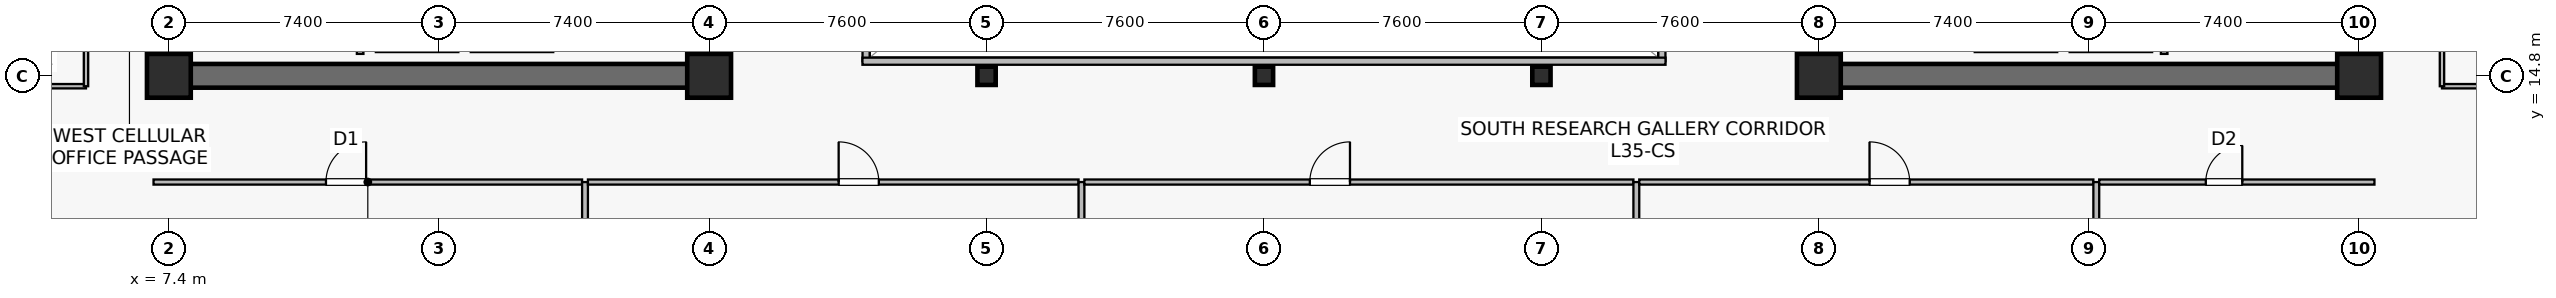
"""IFC4 building model, lengths in metres.
Left out: names, types, materials, properties, quantities, classifications, styles, units other than length and angle.
Written with IfcOpenShell. Run it as: python <this file> out.ifc"""

import sys

from ifc_helpers import new_model, si_unit, direction, frame, frame_2d, origin, origin_2d, place, context, subcontext, project, spatial, rectangle, hollow_rectangle, extrude, source, transform, mapped, element, fill, save


model = new_model("IFC4")
c1 = context("Model", 3, precision=1e-05, world=origin(), true_north=direction((0.0, 1.0)))
c2 = subcontext(c1, "Body", "Model", "MODEL_VIEW")
j1 = project(units=[si_unit("LENGTHUNIT", "METRE"), si_unit("PLANEANGLEUNIT", "RADIAN")], contexts=[c1])
p1 = place(None, origin())
s1 = spatial("IfcSite", under=j1, at=p1, CompositionType="ELEMENT")
p2 = place(p1, origin())
s2 = spatial("IfcBuilding", under=s1, at=p2, CompositionType="ELEMENT")
p3 = place(p2, frame((0.0, 0.0, 146.1)))
s3 = spatial("IfcBuildingStorey", under=s2, at=p3, CompositionType="ELEMENT", Elevation=146.1)
p4 = place(p3, frame((7.075, 14.8, 0.0), z_axis=(0.0, 0.0, 1.0), x_axis=(1.0, 0.0, 0.0)))
e1 = element("IfcWall", 1, at=p4, inside=s3, PredefinedType="SHEAR", context=c2, shape_type="SweptSolid", body=[
    extrude(rectangle(XDim=15.45, YDim=0.65, at=frame_2d((7.725, 0.0))), origin(), (0.0, 0.0, 1.0), 3.79),
])
p5 = place(p3, frame((7.4, 15.125, 0.0), z_axis=(0.0, 0.0, 1.0), x_axis=(0.0, 1.0, 0.0)))
e2 = element("IfcWall", 2, at=p5, inside=s3, PredefinedType="SHEAR", context=c2, shape_type="SweptSolid", body=[
    extrude(rectangle(XDim=18.35, YDim=0.65, at=frame_2d((9.175, 0.0))), origin(), (0.0, 0.0, 1.0), 3.79),
])
p6 = place(p3, frame((22.2, 15.125, 0.0), z_axis=(0.0, 0.0, 1.0), x_axis=(0.0, 1.0, 0.0)))
e3 = element("IfcWall", 3, at=p6, inside=s3, PredefinedType="SHEAR", context=c2, shape_type="SweptSolid", body=[
    extrude(rectangle(XDim=18.35, YDim=0.65, at=frame_2d((9.175, 0.0))), origin(), (0.0, 0.0, 1.0), 3.79),
])
p7 = place(p6, frame((3.425, 0.0, 0.0)))
e4 = element("IfcOpeningElement", 4, at=p7, cuts=e3, PredefinedType="OPENING", context=c2, shape_type="SweptSolid", body=[
    extrude(rectangle(XDim=1.42, YDim=2.2, at=frame_2d((0.71, 1.1))), frame((0.0, 0.335, 0.0), z_axis=(0.0, -1.0, 0.0), x_axis=(1.0, 0.0, 0.0)), (0.0, 0.0, 1.0), 0.67),
])
p8 = place(p3, frame((52.275, 14.8, 0.0), z_axis=(0.0, 0.0, 1.0), x_axis=(1.0, 0.0, 0.0)))
e5 = element("IfcWall", 5, at=p8, inside=s3, PredefinedType="SHEAR", context=c2, shape_type="SweptSolid", body=[
    extrude(rectangle(XDim=15.45, YDim=0.65, at=frame_2d((7.725, 0.0))), origin(), (0.0, 0.0, 1.0), 3.79),
])
p9 = place(p3, frame((52.6, 15.125, 0.0), z_axis=(0.0, 0.0, 1.0), x_axis=(0.0, 1.0, 0.0)))
e6 = element("IfcWall", 6, at=p9, inside=s3, PredefinedType="SHEAR", context=c2, shape_type="SweptSolid", body=[
    extrude(rectangle(XDim=18.35, YDim=0.65, at=frame_2d((9.175, 0.0))), origin(), (0.0, 0.0, 1.0), 3.79),
])
p10 = place(p9, frame((3.425, 0.0, 0.0)))
e7 = element("IfcOpeningElement", 7, at=p10, cuts=e6, PredefinedType="OPENING", context=c2, shape_type="SweptSolid", body=[
    extrude(rectangle(XDim=1.42, YDim=2.2, at=frame_2d((0.71, 1.1))), frame((0.0, 0.335, 0.0), z_axis=(0.0, -1.0, 0.0), x_axis=(1.0, 0.0, 0.0)), (0.0, 0.0, 1.0), 0.67),
])
p11 = place(p3, frame((67.4, 15.125, 0.0), z_axis=(0.0, 0.0, 1.0), x_axis=(0.0, 1.0, 0.0)))
e8 = element("IfcWall", 8, at=p11, inside=s3, PredefinedType="SHEAR", context=c2, shape_type="SweptSolid", body=[
    extrude(rectangle(XDim=18.35, YDim=0.65, at=frame_2d((9.175, 0.0))), origin(), (0.0, 0.0, 1.0), 3.79),
])
m1 = source(origin(), c2, "Body", "SweptSolid", [
    extrude(rectangle(XDim=1.2, YDim=1.2, at=origin_2d()), origin(), (0.0, 0.0, 1.0), 4.1),
])
for number, where, z_axis, x_axis in (
    (9, (7.4, 14.8, 0.0), (0.0, 0.0, 1.0), (1.0, 0.0, 0.0)),
    (10, (22.2, 14.8, 0.0), (0.0, 0.0, 1.0), (1.0, 0.0, 0.0)),
    (11, (52.6, 14.8, 0.0), (0.0, 0.0, 1.0), (1.0, 0.0, 0.0)),
    (12, (67.4, 14.8, 0.0), (0.0, 0.0, 1.0), (1.0, 0.0, 0.0)),
):
    element("IfcColumn", number, at=place(p3, frame(where, z_axis=z_axis, x_axis=x_axis)), inside=s3, PredefinedType="COLUMN", context=c2, shape_type="MappedRepresentation", body=[
        mapped(m1, transform((0.0, 0.0, 0.0), scale=1.0)),
    ])
m2 = source(origin(), c2, "Body", "SweptSolid", [
    extrude(hollow_rectangle(XDim=0.5, YDim=0.5, WallThickness=0.022, at=origin_2d()), origin(), (0.0, 0.0, 1.0), 4.1),
])
for number, where, z_axis, x_axis in (
    (13, (29.8, 14.8, 0.0), (0.0, 0.0, 1.0), (1.0, 0.0, 0.0)),
    (14, (37.4, 14.8, 0.0), (0.0, 0.0, 1.0), (1.0, 0.0, 0.0)),
    (15, (45.0, 14.8, 0.0), (0.0, 0.0, 1.0), (1.0, 0.0, 0.0)),
):
    element("IfcColumn", number, at=place(p3, frame(where, z_axis=z_axis, x_axis=x_axis)), inside=s3, PredefinedType="COLUMN", context=c2, shape_type="MappedRepresentation", body=[
        mapped(m2, transform((0.0, 0.0, 0.0), scale=1.0)),
    ])
p12 = place(p3, frame((13.07, 15.55, 0.0), z_axis=(0.0, 0.0, 1.0), x_axis=(1.0, 0.0, 0.0)))
e16 = element("IfcWall", 16, at=p12, inside=s3, PredefinedType="SOLIDWALL", context=c2, shape_type="SweptSolid", body=[
    extrude(rectangle(XDim=2.26, YDim=0.2, at=frame_2d((1.13, 0.0))), origin(), (0.0, 0.0, 1.0), 3.125),
])
p13 = place(p3, frame((15.67, 15.55, 0.0), z_axis=(0.0, 0.0, 1.0), x_axis=(1.0, 0.0, 0.0)))
e17 = element("IfcWall", 17, at=p13, inside=s3, PredefinedType="SOLIDWALL", context=c2, shape_type="SweptSolid", body=[
    extrude(rectangle(XDim=2.26, YDim=0.2, at=frame_2d((1.13, 0.0))), origin(), (0.0, 0.0, 1.0), 3.79),
])
p14 = place(p3, frame((12.64, 15.4, 0.0), z_axis=(0.0, 0.0, 1.0), x_axis=(0.0, 1.0, 0.0)))
e18 = element("IfcWall", 18, at=p14, inside=s3, PredefinedType="SOLIDWALL", context=c2, shape_type="SweptSolid", body=[
    extrude(rectangle(XDim=2.4, YDim=0.18, at=frame_2d((1.2, 0.0))), origin(), (0.0, 0.0, 1.0), 3.79),
])
p15 = place(p3, frame((59.47, 15.55, 0.0), z_axis=(0.0, 0.0, 1.0), x_axis=(1.0, 0.0, 0.0)))
e19 = element("IfcWall", 19, at=p15, inside=s3, PredefinedType="SOLIDWALL", context=c2, shape_type="SweptSolid", body=[
    extrude(rectangle(XDim=2.26, YDim=0.2, at=frame_2d((1.13, 0.0))), origin(), (0.0, 0.0, 1.0), 3.125),
])
p16 = place(p3, frame((56.87, 15.55, 0.0), z_axis=(0.0, 0.0, 1.0), x_axis=(1.0, 0.0, 0.0)))
e20 = element("IfcWall", 20, at=p16, inside=s3, PredefinedType="SOLIDWALL", context=c2, shape_type="SweptSolid", body=[
    extrude(rectangle(XDim=2.26, YDim=0.2, at=frame_2d((1.13, 0.0))), origin(), (0.0, 0.0, 1.0), 3.79),
])
p17 = place(p3, frame((62.06, 15.4, 0.0), z_axis=(0.0, 0.0, 1.0), x_axis=(0.0, 1.0, 0.0)))
e21 = element("IfcWall", 21, at=p17, inside=s3, PredefinedType="SOLIDWALL", context=c2, shape_type="SweptSolid", body=[
    extrude(rectangle(XDim=2.4, YDim=0.18, at=frame_2d((1.2, 0.0))), origin(), (0.0, 0.0, 1.0), 3.79),
])
p18 = place(p3, frame((26.5, 15.2, 0.0), z_axis=(0.0, 0.0, 1.0), x_axis=(0.0, 1.0, 0.0)))
e22 = element("IfcWall", 22, at=p18, inside=s3, PredefinedType="SOLIDWALL", context=c2, shape_type="SweptSolid", body=[
    extrude(rectangle(XDim=18.2, YDim=0.195, at=frame_2d((9.1, 0.0))), origin(), (0.0, 0.0, 1.0), 3.79),
])
p19 = place(p18, frame((1.8, 0.0, 0.9)))
e23 = element("IfcOpeningElement", 23, at=p19, cuts=e22, PredefinedType="OPENING", context=c2, shape_type="SweptSolid", body=[
    extrude(rectangle(XDim=1.2, YDim=1.35, at=frame_2d((0.6, 0.675))), frame((0.0, 0.107, 0.0), z_axis=(0.0, -1.0, 0.0), x_axis=(1.0, 0.0, 0.0)), (0.0, 0.0, 1.0), 0.215),
])
p20 = place(p18, frame((13.2, 0.0, 0.9)))
e24 = element("IfcOpeningElement", 24, at=p20, cuts=e22, PredefinedType="OPENING", context=c2, shape_type="SweptSolid", body=[
    extrude(rectangle(XDim=1.2, YDim=1.35, at=frame_2d((0.6, 0.675))), frame((0.0, 0.107, 0.0), z_axis=(0.0, -1.0, 0.0), x_axis=(1.0, 0.0, 0.0)), (0.0, 0.0, 1.0), 0.215),
])
p21 = place(p3, frame((48.3, 15.2, 0.0), z_axis=(0.0, 0.0, 1.0), x_axis=(0.0, 1.0, 0.0)))
e25 = element("IfcWall", 25, at=p21, inside=s3, PredefinedType="SOLIDWALL", context=c2, shape_type="SweptSolid", body=[
    extrude(rectangle(XDim=18.2, YDim=0.195, at=frame_2d((9.1, 0.0))), origin(), (0.0, 0.0, 1.0), 3.79),
])
p22 = place(p21, frame((1.8, 0.0, 0.9)))
e26 = element("IfcOpeningElement", 26, at=p22, cuts=e25, PredefinedType="OPENING", context=c2, shape_type="SweptSolid", body=[
    extrude(rectangle(XDim=1.2, YDim=1.35, at=frame_2d((0.6, 0.675))), frame((0.0, 0.107, 0.0), z_axis=(0.0, -1.0, 0.0), x_axis=(1.0, 0.0, 0.0)), (0.0, 0.0, 1.0), 0.215),
])
p23 = place(p21, frame((13.2, 0.0, 0.9)))
e27 = element("IfcOpeningElement", 27, at=p23, cuts=e25, PredefinedType="OPENING", context=c2, shape_type="SweptSolid", body=[
    extrude(rectangle(XDim=1.2, YDim=1.35, at=frame_2d((0.6, 0.675))), frame((0.0, 0.107, 0.0), z_axis=(0.0, -1.0, 0.0), x_axis=(1.0, 0.0, 0.0)), (0.0, 0.0, 1.0), 0.215),
])
p24 = place(p3, frame((26.4, 15.2, 0.0), z_axis=(0.0, 0.0, 1.0), x_axis=(1.0, 0.0, 0.0)))
e28 = element("IfcWall", 28, at=p24, inside=s3, PredefinedType="SOLIDWALL", context=c2, shape_type="SweptSolid", body=[
    extrude(rectangle(XDim=22.0, YDim=0.195, at=frame_2d((11.0, 0.0))), origin(), (0.0, 0.0, 1.0), 3.79),
])
p25 = place(p3, frame((6.98, 11.89, 0.0), z_axis=(0.0, 0.0, 1.0), x_axis=(1.0, 0.0, 0.0)))
e29 = element("IfcWall", 29, at=p25, inside=s3, PredefinedType="PARTITIONING", context=c2, shape_type="SweptSolid", body=[
    extrude(rectangle(XDim=11.74, YDim=0.14, at=frame_2d((5.87, 0.0))), origin(), (0.0, 0.0, 1.0), 3.125),
])
p26 = place(p25, frame((4.724, 0.0, 0.0)))
e30 = element("IfcOpeningElement", 30, at=p26, cuts=e29, PredefinedType="OPENING", context=c2, shape_type="SweptSolid", body=[
    extrude(rectangle(XDim=1.1, YDim=2.18, at=frame_2d((0.55, 1.09))), frame((0.0, 0.08, 0.0), z_axis=(0.0, -1.0, 0.0), x_axis=(1.0, 0.0, 0.0)), (0.0, 0.0, 1.0), 0.16),
])
p27 = place(p3, frame((18.8, 1.41, 0.0), z_axis=(0.0, 0.0, 1.0), x_axis=(0.0, 1.0, 0.0)))
e31 = element("IfcWall", 31, at=p27, inside=s3, PredefinedType="PARTITIONING", context=c2, shape_type="SweptSolid", body=[
    extrude(rectangle(XDim=10.48, YDim=0.16, at=frame_2d((5.24, 0.0))), origin(), (0.0, 0.0, 1.0), 3.075),
])
p28 = place(p3, frame((18.88, 11.89, 0.0), z_axis=(0.0, 0.0, 1.0), x_axis=(1.0, 0.0, 0.0)))
e32 = element("IfcWall", 32, at=p28, inside=s3, PredefinedType="PARTITIONING", context=c2, shape_type="SweptSolid", body=[
    extrude(rectangle(XDim=13.44, YDim=0.14, at=frame_2d((6.72, 0.0))), origin(), (0.0, 0.0, 1.0), 3.125),
])
p29 = place(p28, frame((6.868, 0.0, 0.0)))
e33 = element("IfcOpeningElement", 33, at=p29, cuts=e32, PredefinedType="OPENING", context=c2, shape_type="SweptSolid", body=[
    extrude(rectangle(XDim=1.1, YDim=2.18, at=frame_2d((0.55, 1.09))), frame((0.0, 0.08, 0.0), z_axis=(0.0, -1.0, 0.0), x_axis=(1.0, 0.0, 0.0)), (0.0, 0.0, 1.0), 0.16),
])
p30 = place(p3, frame((32.4, 2.61, 0.0), z_axis=(0.0, 0.0, 1.0), x_axis=(0.0, 1.0, 0.0)))
e34 = element("IfcWall", 34, at=p30, inside=s3, PredefinedType="PARTITIONING", context=c2, shape_type="SweptSolid", body=[
    extrude(rectangle(XDim=9.28, YDim=0.16, at=frame_2d((4.64, 0.0))), origin(), (0.0, 0.0, 1.0), 3.075),
])
p31 = place(p3, frame((32.48, 11.89, 0.0), z_axis=(0.0, 0.0, 1.0), x_axis=(1.0, 0.0, 0.0)))
e35 = element("IfcWall", 35, at=p31, inside=s3, PredefinedType="PARTITIONING", context=c2, shape_type="SweptSolid", body=[
    extrude(rectangle(XDim=15.04, YDim=0.14, at=frame_2d((7.52, 0.0))), origin(), (0.0, 0.0, 1.0), 3.125),
])
p32 = place(p31, frame((6.176, 0.0, 0.0)))
e36 = element("IfcOpeningElement", 36, at=p32, cuts=e35, PredefinedType="OPENING", context=c2, shape_type="SweptSolid", body=[
    extrude(rectangle(XDim=1.1, YDim=2.18, at=frame_2d((0.55, 1.09))), frame((0.0, 0.08, 0.0), z_axis=(0.0, -1.0, 0.0), x_axis=(1.0, 0.0, 0.0)), (0.0, 0.0, 1.0), 0.16),
])
p33 = place(p3, frame((47.6, 2.61, 0.0), z_axis=(0.0, 0.0, 1.0), x_axis=(0.0, 1.0, 0.0)))
e37 = element("IfcWall", 37, at=p33, inside=s3, PredefinedType="PARTITIONING", context=c2, shape_type="SweptSolid", body=[
    extrude(rectangle(XDim=9.28, YDim=0.16, at=frame_2d((4.64, 0.0))), origin(), (0.0, 0.0, 1.0), 3.075),
])
p34 = place(p3, frame((47.68, 11.89, 0.0), z_axis=(0.0, 0.0, 1.0), x_axis=(1.0, 0.0, 0.0)))
e38 = element("IfcWall", 38, at=p34, inside=s3, PredefinedType="PARTITIONING", context=c2, shape_type="SweptSolid", body=[
    extrude(rectangle(XDim=12.44, YDim=0.14, at=frame_2d((6.22, 0.0))), origin(), (0.0, 0.0, 1.0), 3.125),
])
p35 = place(p34, frame((6.308, 0.0, 0.0)))
e39 = element("IfcOpeningElement", 39, at=p35, cuts=e38, PredefinedType="OPENING", context=c2, shape_type="SweptSolid", body=[
    extrude(rectangle(XDim=1.1, YDim=2.18, at=frame_2d((0.55, 1.09))), frame((0.0, 0.08, 0.0), z_axis=(0.0, -1.0, 0.0), x_axis=(1.0, 0.0, 0.0)), (0.0, 0.0, 1.0), 0.16),
])
p36 = place(p3, frame((60.2, 1.41, 0.0), z_axis=(0.0, 0.0, 1.0), x_axis=(0.0, 1.0, 0.0)))
e40 = element("IfcWall", 40, at=p36, inside=s3, PredefinedType="PARTITIONING", context=c2, shape_type="SweptSolid", body=[
    extrude(rectangle(XDim=10.48, YDim=0.16, at=frame_2d((5.24, 0.0))), origin(), (0.0, 0.0, 1.0), 3.075),
])
p37 = place(p3, frame((60.28, 11.89, 0.0), z_axis=(0.0, 0.0, 1.0), x_axis=(1.0, 0.0, 0.0)))
e41 = element("IfcWall", 41, at=p37, inside=s3, PredefinedType="PARTITIONING", context=c2, shape_type="SweptSolid", body=[
    extrude(rectangle(XDim=7.54, YDim=0.14, at=frame_2d((3.77, 0.0))), origin(), (0.0, 0.0, 1.0), 3.275),
])
p38 = place(p37, frame((2.92, 0.0, 0.0)))
e42 = element("IfcOpeningElement", 42, at=p38, cuts=e41, PredefinedType="OPENING", context=c2, shape_type="SweptSolid", body=[
    extrude(rectangle(XDim=1.0, YDim=2.15, at=frame_2d((0.5, 1.075))), frame((0.0, 0.08, 0.0), z_axis=(0.0, -1.0, 0.0), x_axis=(1.0, 0.0, 0.0)), (0.0, 0.0, 1.0), 0.16),
])
p39 = place(p3, frame((2.11, 14.515, 0.0), z_axis=(0.0, 0.0, 1.0), x_axis=(1.0, 0.0, 0.0)))
e43 = element("IfcWall", 43, at=p39, inside=s3, PredefinedType="PARTITIONING", context=c2, shape_type="SweptSolid", body=[
    extrude(rectangle(XDim=3.02, YDim=0.12, at=frame_2d((1.51, 0.0))), origin(), (0.0, 0.0, 1.0), 3.79),
])
p40 = place(p3, frame((5.13, 14.515, 0.0), z_axis=(0.0, 0.0, 1.0), x_axis=(0.0, 1.0, 0.0)))
e44 = element("IfcWall", 44, at=p40, inside=s3, PredefinedType="PARTITIONING", context=c2, shape_type="SweptSolid", body=[
    extrude(rectangle(XDim=10.025, YDim=0.12, at=frame_2d((5.013, 0.0))), origin(), (0.0, 0.0, 1.0), 3.79),
])
p41 = place(p40, frame((4.562, 0.0, 0.0)))
e45 = element("IfcOpeningElement", 45, at=p41, cuts=e44, PredefinedType="OPENING", context=c2, shape_type="SweptSolid", body=[
    extrude(rectangle(XDim=0.9, YDim=2.1, at=frame_2d((0.45, 1.05))), frame((0.0, 0.07, 0.0), z_axis=(0.0, -1.0, 0.0), x_axis=(1.0, 0.0, 0.0)), (0.0, 0.0, 1.0), 0.14),
])
p42 = place(p3, frame((69.67, 14.515, 0.0), z_axis=(0.0, 0.0, 1.0), x_axis=(1.0, 0.0, 0.0)))
e46 = element("IfcWall", 46, at=p42, inside=s3, PredefinedType="PARTITIONING", context=c2, shape_type="SweptSolid", body=[
    extrude(rectangle(XDim=3.02, YDim=0.12, at=frame_2d((1.51, 0.0))), origin(), (0.0, 0.0, 1.0), 3.79),
])
p43 = place(p3, frame((69.67, 14.515, 0.0), z_axis=(0.0, 0.0, 1.0), x_axis=(0.0, 1.0, 0.0)))
e47 = element("IfcWall", 47, at=p43, inside=s3, PredefinedType="PARTITIONING", context=c2, shape_type="SweptSolid", body=[
    extrude(rectangle(XDim=5.225, YDim=0.12, at=frame_2d((2.613, 0.0))), origin(), (0.0, 0.0, 1.0), 3.79),
])
p44 = place(p43, frame((2.163, 0.0, 0.0)))
e48 = element("IfcOpeningElement", 48, at=p44, cuts=e47, PredefinedType="OPENING", context=c2, shape_type="SweptSolid", body=[
    extrude(rectangle(XDim=0.9, YDim=2.1, at=frame_2d((0.45, 1.05))), frame((0.0, 0.07, 0.0), z_axis=(0.0, -1.0, 0.0), x_axis=(1.0, 0.0, 0.0)), (0.0, 0.0, 1.0), 0.14),
])
m3 = source(origin(), c2, "Body", "SweptSolid", [
    extrude(rectangle(XDim=1.1, YDim=2.18, at=frame_2d((0.55, 1.09))), frame((0.0, 0.025, 0.0), z_axis=(0.0, -1.0, 0.0), x_axis=(1.0, 0.0, 0.0)), (0.0, 0.0, 1.0), 0.05),
])
p45 = place(p26, origin())
e49 = element("IfcDoor", 49, at=p45, inside=s3, OperationType="SINGLE_SWING_RIGHT", PredefinedType="DOOR", context=c2, shape_type="MappedRepresentation", body=[
    mapped(m3, transform((0.0, 0.0, 0.0), scale=1.0)),
])
fill(e30, e49)
p46 = place(p29, origin())
e50 = element("IfcDoor", 50, at=p46, inside=s3, OperationType="SINGLE_SWING_LEFT", PredefinedType="DOOR", context=c2, shape_type="MappedRepresentation", body=[
    mapped(m3, transform((0.0, 0.0, 0.0), scale=1.0)),
])
fill(e33, e50)
p47 = place(p32, origin())
e51 = element("IfcDoor", 51, at=p47, inside=s3, OperationType="SINGLE_SWING_RIGHT", PredefinedType="DOOR", context=c2, shape_type="MappedRepresentation", body=[
    mapped(m3, transform((0.0, 0.0, 0.0), scale=1.0)),
])
fill(e36, e51)
p48 = place(p35, origin())
e52 = element("IfcDoor", 52, at=p48, inside=s3, OperationType="SINGLE_SWING_LEFT", PredefinedType="DOOR", context=c2, shape_type="MappedRepresentation", body=[
    mapped(m3, transform((0.0, 0.0, 0.0), scale=1.0)),
])
fill(e39, e52)
m4 = source(origin(), c2, "Body", "SweptSolid", [
    extrude(rectangle(XDim=1.0, YDim=2.15, at=frame_2d((0.5, 1.075))), frame((0.0, 0.025, 0.0), z_axis=(0.0, -1.0, 0.0), x_axis=(1.0, 0.0, 0.0)), (0.0, 0.0, 1.0), 0.05),
])
p49 = place(p38, origin())
e53 = element("IfcDoor", 53, at=p49, inside=s3, OperationType="SINGLE_SWING_RIGHT", PredefinedType="DOOR", context=c2, shape_type="MappedRepresentation", body=[
    mapped(m4, transform((0.0, 0.0, 0.0), scale=1.0)),
])
fill(e42, e53)
save(model, sys.argv[1])
